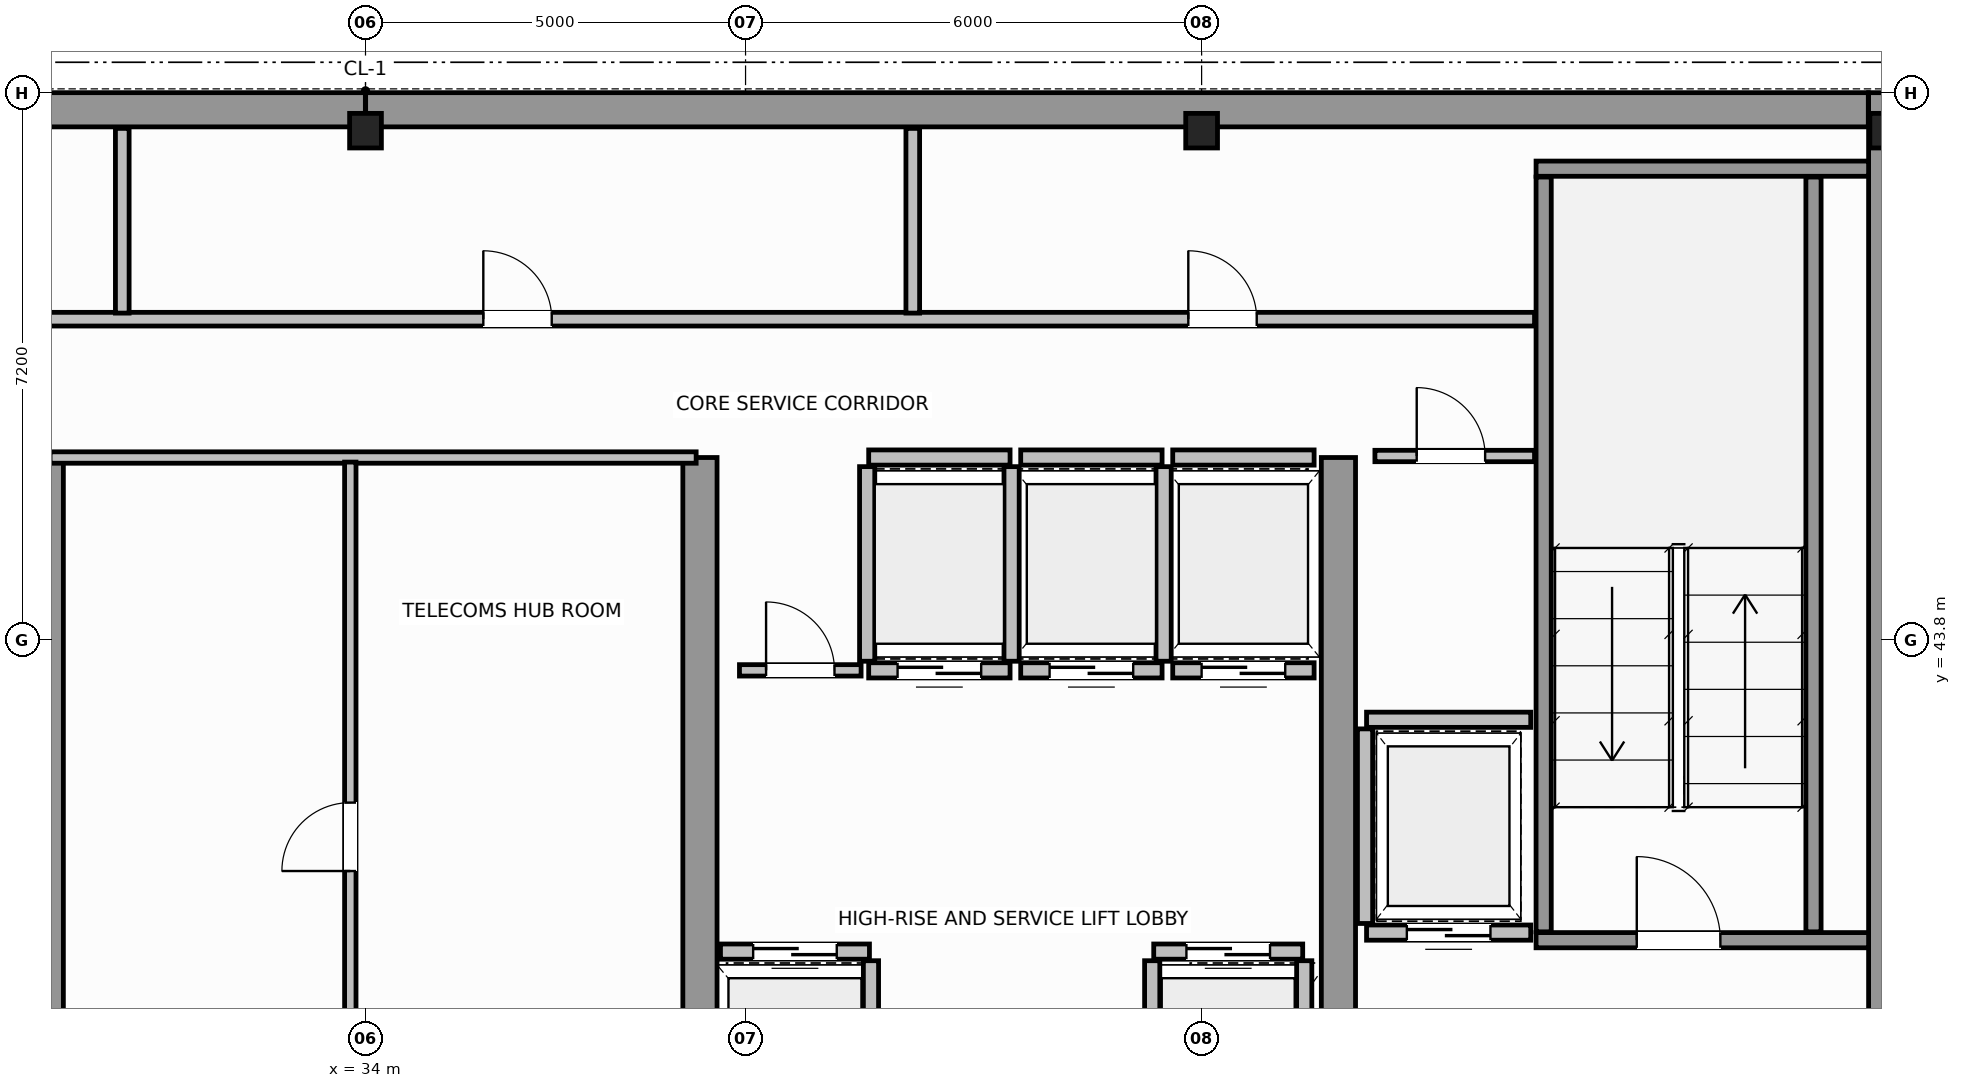
"""IFC4 building model, lengths in metres.
Left out: names, types, materials, properties, quantities, classifications, styles, units other than length and angle.
Written with IfcOpenShell. Run it as: python <this file> out.ifc"""

import sys

from ifc_helpers import new_model, si_unit, direction, frame, frame_2d, origin, origin_2d, place, context, subcontext, project, spatial, rectangle, i_section, extrude, source, transform, mapped, element, fill, save


model = new_model("IFC4")
c1 = context("Model", 3, precision=1e-05, world=origin(), true_north=direction((0.0, 1.0)))
c2 = subcontext(c1, "Body", "Model", "MODEL_VIEW")
j1 = project(units=[si_unit("LENGTHUNIT", "METRE"), si_unit("PLANEANGLEUNIT", "RADIAN")], contexts=[c1])
p1 = place(None, origin())
s1 = spatial("IfcSite", under=j1, at=p1, CompositionType="ELEMENT")
p2 = place(p1, origin())
s2 = spatial("IfcBuilding", under=s1, at=p2, CompositionType="ELEMENT")
p3 = place(p2, frame((0.0, 0.0, 268.8)))
s3 = spatial("IfcBuildingStorey", under=s2, at=p3, CompositionType="ELEMENT", Elevation=268.8)
m1 = source(origin(), c2, "Body", "SweptSolid", [
    extrude(i_section(OverallWidth=0.418, OverallDepth=0.455, WebThickness=0.042, FlangeThickness=0.058, FilletRadius=0.015, at=origin_2d()), origin(), (0.0, 0.0, 1.0), 3.8),
])
for number, where, z_axis, x_axis in (
    (1, (34.0, 50.5, 0.0), (0.0, 0.0, 1.0), (1.0, 0.0, 0.0)),
    (2, (45.0, 50.5, 0.0), (0.0, 0.0, 1.0), (1.0, 0.0, 0.0)),
    (3, (54.0, 50.5, 0.0), (0.0, 0.0, 1.0), (1.0, 0.0, 0.0)),
):
    element("IfcColumn", number, at=place(p3, frame(where, z_axis=z_axis, x_axis=x_axis)), inside=s3, PredefinedType="COLUMN", context=c2, shape_type="MappedRepresentation", body=[
        mapped(m1, transform((0.0, 0.0, 0.0), scale=1.0)),
    ])
for number, where, z_axis, x_axis in (
    (4, (14.229, 50.775, 0.0), (0.0, 0.0, 1.0), (1.0, 0.0, 0.0)),
    (5, (34.002, 50.775, 0.0), (0.0, 0.0, 1.0), (1.0, 0.0, 0.0)),
):
    element("IfcWall", number, at=place(p3, frame(where, z_axis=z_axis, x_axis=x_axis)), inside=s3, PredefinedType="SHEAR", context=c2, shape_type="SweptSolid", body=[
        extrude(rectangle(XDim=19.769, YDim=0.45, at=frame_2d((9.885, 0.0))), origin(), (0.0, 0.0, 1.0), 3.8),
    ])
p4 = place(p3, frame((54.0, 36.5, 0.0), z_axis=(0.0, 0.0, 1.0), x_axis=(0.0, 1.0, 0.0)))
e6 = element("IfcWall", 6, at=p4, inside=s3, PredefinedType="SHEAR", context=c2, shape_type="SweptSolid", body=[
    extrude(rectangle(XDim=14.5, YDim=0.45, at=frame_2d((7.25, 0.0))), origin(), (0.0, 0.0, 1.0), 3.8),
])
for number, where, z_axis, x_axis in (
    (7, (29.8, 36.745, 0.0), (0.0, 0.0, 1.0), (0.0, 1.0, 0.0)),
    (8, (38.4, 36.745, 0.0), (0.0, 0.0, 1.0), (0.0, 1.0, 0.0)),
    (9, (46.8, 36.745, 0.0), (0.0, 0.0, 1.0), (0.0, 1.0, 0.0)),
):
    element("IfcWall", number, at=place(p3, frame(where, z_axis=z_axis, x_axis=x_axis)), inside=s3, PredefinedType="SHEAR", context=c2, shape_type="SweptSolid", body=[
        extrude(rectangle(XDim=9.455, YDim=0.45, at=frame_2d((4.728, 0.0))), origin(), (0.0, 0.0, 1.0), 3.8),
    ])
p5 = place(p3, frame((49.4, 39.85, 0.0), z_axis=(0.0, 0.0, 1.0), x_axis=(1.0, 0.0, 0.0)))
e10 = element("IfcWall", 10, at=p5, inside=s3, PredefinedType="SOLIDWALL", context=c2, shape_type="SweptSolid", body=[
    extrude(rectangle(XDim=4.375, YDim=0.2, at=frame_2d((2.188, 0.0))), origin(), (0.0, 0.0, 1.0), 3.8),
])
p6 = place(p5, frame((1.325, 0.0, 0.0)))
e11 = element("IfcOpeningElement", 11, at=p6, cuts=e10, PredefinedType="OPENING", context=c2, shape_type="SweptSolid", body=[
    extrude(rectangle(XDim=1.1, YDim=2.15, at=frame_2d((0.55, 1.075))), frame((0.0, 0.11, 0.0), z_axis=(0.0, -1.0, 0.0), x_axis=(1.0, 0.0, 0.0)), (0.0, 0.0, 1.0), 0.22),
])
p7 = place(p3, frame((49.4, 50.0, 0.0), z_axis=(0.0, 0.0, 1.0), x_axis=(1.0, 0.0, 0.0)))
e12 = element("IfcWall", 12, at=p7, inside=s3, PredefinedType="SOLIDWALL", context=c2, shape_type="SweptSolid", body=[
    extrude(rectangle(XDim=4.375, YDim=0.2, at=frame_2d((2.188, 0.0))), origin(), (0.0, 0.0, 1.0), 3.8),
])
for number, where, z_axis, x_axis in (
    (13, (49.5, 39.96, 0.0), (0.0, 0.0, 1.0), (0.0, 1.0, 0.0)),
    (14, (53.05, 39.96, 0.0), (0.0, 0.0, 1.0), (0.0, 1.0, 0.0)),
):
    element("IfcWall", number, at=place(p3, frame(where, z_axis=z_axis, x_axis=x_axis)), inside=s3, PredefinedType="SOLIDWALL", context=c2, shape_type="SweptSolid", body=[
        extrude(rectangle(XDim=9.93, YDim=0.2, at=frame_2d((4.965, 0.0))), origin(), (0.0, 0.0, 1.0), 3.8),
    ])
p8 = place(p3, frame((38.67, 39.7, 0.0), z_axis=(0.0, 0.0, 1.0), x_axis=(1.0, 0.0, 0.0)))
e15 = element("IfcWall", 15, at=p8, inside=s3, PredefinedType="SOLIDWALL", context=c2, shape_type="SweptSolid", body=[
    extrude(rectangle(XDim=1.96, YDim=0.2, at=frame_2d((0.98, 0.0))), origin(), (0.0, 0.0, 1.0), 3.58),
])
p9 = place(p8, frame((0.43, 0.0, 0.0)))
e16 = element("IfcOpeningElement", 16, at=p9, cuts=e15, PredefinedType="OPENING", context=c2, shape_type="SweptSolid", body=[
    extrude(rectangle(XDim=1.1, YDim=2.15, at=frame_2d((0.55, 1.075))), frame((0.0, 0.11, 0.0), z_axis=(0.0, -1.0, 0.0), x_axis=(1.0, 0.0, 0.0)), (0.0, 0.0, 1.0), 0.22),
])
p10 = place(p3, frame((40.65, 37.02, 0.0), z_axis=(0.0, 0.0, 1.0), x_axis=(0.0, 1.0, 0.0)))
e17 = element("IfcWall", 17, at=p10, inside=s3, PredefinedType="SOLIDWALL", context=c2, shape_type="SweptSolid", body=[
    extrude(rectangle(XDim=2.56, YDim=0.2, at=frame_2d((1.28, 0.0))), origin(), (0.0, 0.0, 1.0), 3.58),
])
p11 = place(p3, frame((44.37, 39.7, 0.0), z_axis=(0.0, 0.0, 1.0), x_axis=(1.0, 0.0, 0.0)))
e18 = element("IfcWall", 18, at=p11, inside=s3, PredefinedType="SOLIDWALL", context=c2, shape_type="SweptSolid", body=[
    extrude(rectangle(XDim=1.96, YDim=0.2, at=frame_2d((0.98, 0.0))), origin(), (0.0, 0.0, 1.0), 3.58),
])
p12 = place(p11, frame((0.43, 0.0, 0.0)))
e19 = element("IfcOpeningElement", 19, at=p12, cuts=e18, PredefinedType="OPENING", context=c2, shape_type="SweptSolid", body=[
    extrude(rectangle(XDim=1.1, YDim=2.15, at=frame_2d((0.55, 1.075))), frame((0.0, 0.11, 0.0), z_axis=(0.0, -1.0, 0.0), x_axis=(1.0, 0.0, 0.0)), (0.0, 0.0, 1.0), 0.22),
])
for number, where, z_axis, x_axis in (
    (20, (44.35, 37.02, 0.0), (0.0, 0.0, 1.0), (0.0, 1.0, 0.0)),
    (21, (46.35, 37.02, 0.0), (0.0, 0.0, 1.0), (0.0, 1.0, 0.0)),
):
    element("IfcWall", number, at=place(p3, frame(where, z_axis=z_axis, x_axis=x_axis)), inside=s3, PredefinedType="SOLIDWALL", context=c2, shape_type="SweptSolid", body=[
        extrude(rectangle(XDim=2.56, YDim=0.2, at=frame_2d((1.28, 0.0))), origin(), (0.0, 0.0, 1.0), 3.58),
    ])
p13 = place(p3, frame((40.62, 43.4, 0.0), z_axis=(0.0, 0.0, 1.0), x_axis=(1.0, 0.0, 0.0)))
e22 = element("IfcWall", 22, at=p13, inside=s3, PredefinedType="SOLIDWALL", context=c2, shape_type="SweptSolid", body=[
    extrude(rectangle(XDim=1.86, YDim=0.2, at=frame_2d((0.93, 0.0))), origin(), (0.0, 0.0, 1.0), 3.58),
])
p14 = place(p13, frame((0.38, 0.0, 0.0)))
e23 = element("IfcOpeningElement", 23, at=p14, cuts=e22, PredefinedType="OPENING", context=c2, shape_type="SweptSolid", body=[
    extrude(rectangle(XDim=1.1, YDim=2.15, at=frame_2d((0.55, 1.075))), frame((0.0, 0.11, 0.0), z_axis=(0.0, -1.0, 0.0), x_axis=(1.0, 0.0, 0.0)), (0.0, 0.0, 1.0), 0.22),
])
p15 = place(p3, frame((40.62, 46.2, 0.0), z_axis=(0.0, 0.0, 1.0), x_axis=(1.0, 0.0, 0.0)))
e24 = element("IfcWall", 24, at=p15, inside=s3, PredefinedType="SOLIDWALL", context=c2, shape_type="SweptSolid", body=[
    extrude(rectangle(XDim=1.86, YDim=0.2, at=frame_2d((0.93, 0.0))), origin(), (0.0, 0.0, 1.0), 3.58),
])
for number, where, z_axis, x_axis in (
    (25, (40.6, 43.52, 0.0), (0.0, 0.0, 1.0), (0.0, 1.0, 0.0)),
    (26, (42.5, 43.52, 0.0), (0.0, 0.0, 1.0), (0.0, 1.0, 0.0)),
):
    element("IfcWall", number, at=place(p3, frame(where, z_axis=z_axis, x_axis=x_axis)), inside=s3, PredefinedType="SOLIDWALL", context=c2, shape_type="SweptSolid", body=[
        extrude(rectangle(XDim=2.56, YDim=0.2, at=frame_2d((1.28, 0.0))), origin(), (0.0, 0.0, 1.0), 3.58),
    ])
p16 = place(p3, frame((42.62, 43.4, 0.0), z_axis=(0.0, 0.0, 1.0), x_axis=(1.0, 0.0, 0.0)))
e27 = element("IfcWall", 27, at=p16, inside=s3, PredefinedType="SOLIDWALL", context=c2, shape_type="SweptSolid", body=[
    extrude(rectangle(XDim=1.86, YDim=0.2, at=frame_2d((0.93, 0.0))), origin(), (0.0, 0.0, 1.0), 3.58),
])
p17 = place(p16, frame((0.38, 0.0, 0.0)))
e28 = element("IfcOpeningElement", 28, at=p17, cuts=e27, PredefinedType="OPENING", context=c2, shape_type="SweptSolid", body=[
    extrude(rectangle(XDim=1.1, YDim=2.15, at=frame_2d((0.55, 1.075))), frame((0.0, 0.11, 0.0), z_axis=(0.0, -1.0, 0.0), x_axis=(1.0, 0.0, 0.0)), (0.0, 0.0, 1.0), 0.22),
])
p18 = place(p3, frame((42.62, 46.2, 0.0), z_axis=(0.0, 0.0, 1.0), x_axis=(1.0, 0.0, 0.0)))
e29 = element("IfcWall", 29, at=p18, inside=s3, PredefinedType="SOLIDWALL", context=c2, shape_type="SweptSolid", body=[
    extrude(rectangle(XDim=1.86, YDim=0.2, at=frame_2d((0.93, 0.0))), origin(), (0.0, 0.0, 1.0), 3.58),
])
p19 = place(p3, frame((44.5, 43.52, 0.0), z_axis=(0.0, 0.0, 1.0), x_axis=(0.0, 1.0, 0.0)))
e30 = element("IfcWall", 30, at=p19, inside=s3, PredefinedType="SOLIDWALL", context=c2, shape_type="SweptSolid", body=[
    extrude(rectangle(XDim=2.56, YDim=0.2, at=frame_2d((1.28, 0.0))), origin(), (0.0, 0.0, 1.0), 3.58),
])
p20 = place(p3, frame((44.62, 43.4, 0.0), z_axis=(0.0, 0.0, 1.0), x_axis=(1.0, 0.0, 0.0)))
e31 = element("IfcWall", 31, at=p20, inside=s3, PredefinedType="SOLIDWALL", context=c2, shape_type="SweptSolid", body=[
    extrude(rectangle(XDim=1.86, YDim=0.2, at=frame_2d((0.93, 0.0))), origin(), (0.0, 0.0, 1.0), 3.58),
])
p21 = place(p20, frame((0.38, 0.0, 0.0)))
e32 = element("IfcOpeningElement", 32, at=p21, cuts=e31, PredefinedType="OPENING", context=c2, shape_type="SweptSolid", body=[
    extrude(rectangle(XDim=1.1, YDim=2.15, at=frame_2d((0.55, 1.075))), frame((0.0, 0.11, 0.0), z_axis=(0.0, -1.0, 0.0), x_axis=(1.0, 0.0, 0.0)), (0.0, 0.0, 1.0), 0.22),
])
p22 = place(p3, frame((44.62, 46.2, 0.0), z_axis=(0.0, 0.0, 1.0), x_axis=(1.0, 0.0, 0.0)))
e33 = element("IfcWall", 33, at=p22, inside=s3, PredefinedType="SOLIDWALL", context=c2, shape_type="SweptSolid", body=[
    extrude(rectangle(XDim=1.86, YDim=0.2, at=frame_2d((0.93, 0.0))), origin(), (0.0, 0.0, 1.0), 3.58),
])
p23 = place(p3, frame((47.17, 39.95, 0.0), z_axis=(0.0, 0.0, 1.0), x_axis=(1.0, 0.0, 0.0)))
e34 = element("IfcWall", 34, at=p23, inside=s3, PredefinedType="SOLIDWALL", context=c2, shape_type="SweptSolid", body=[
    extrude(rectangle(XDim=2.16, YDim=0.2, at=frame_2d((1.08, 0.0))), origin(), (0.0, 0.0, 1.0), 3.58),
])
p24 = place(p23, frame((0.53, 0.0, 0.0)))
e35 = element("IfcOpeningElement", 35, at=p24, cuts=e34, PredefinedType="OPENING", context=c2, shape_type="SweptSolid", body=[
    extrude(rectangle(XDim=1.1, YDim=2.15, at=frame_2d((0.55, 1.075))), frame((0.0, 0.11, 0.0), z_axis=(0.0, -1.0, 0.0), x_axis=(1.0, 0.0, 0.0)), (0.0, 0.0, 1.0), 0.22),
])
p25 = place(p3, frame((47.17, 42.75, 0.0), z_axis=(0.0, 0.0, 1.0), x_axis=(1.0, 0.0, 0.0)))
e36 = element("IfcWall", 36, at=p25, inside=s3, PredefinedType="SOLIDWALL", context=c2, shape_type="SweptSolid", body=[
    extrude(rectangle(XDim=2.16, YDim=0.2, at=frame_2d((1.08, 0.0))), origin(), (0.0, 0.0, 1.0), 3.58),
])
p26 = place(p3, frame((47.15, 40.07, 0.0), z_axis=(0.0, 0.0, 1.0), x_axis=(0.0, 1.0, 0.0)))
e37 = element("IfcWall", 37, at=p26, inside=s3, PredefinedType="SOLIDWALL", context=c2, shape_type="SweptSolid", body=[
    extrude(rectangle(XDim=2.56, YDim=0.2, at=frame_2d((1.28, 0.0))), origin(), (0.0, 0.0, 1.0), 3.58),
])
p27 = place(p3, frame((29.85, 46.2, 0.0), z_axis=(0.0, 0.0, 1.0), x_axis=(1.0, 0.0, 0.0)))
e38 = element("IfcWall", 38, at=p27, inside=s3, PredefinedType="PARTITIONING", context=c2, shape_type="SweptSolid", body=[
    extrude(rectangle(XDim=8.5, YDim=0.15, at=frame_2d((4.25, 0.0))), origin(), (0.0, 0.0, 1.0), 3.58),
])
p28 = place(p3, frame((33.8, 36.56, 0.0), z_axis=(0.0, 0.0, 1.0), x_axis=(0.0, 1.0, 0.0)))
e39 = element("IfcWall", 39, at=p28, inside=s3, PredefinedType="PARTITIONING", context=c2, shape_type="SweptSolid", body=[
    extrude(rectangle(XDim=9.58, YDim=0.15, at=frame_2d((4.79, 0.0))), origin(), (0.0, 0.0, 1.0), 3.58),
])
p29 = place(p28, frame((4.2, 0.0, 0.0)))
e40 = element("IfcOpeningElement", 40, at=p29, cuts=e39, PredefinedType="OPENING", context=c2, shape_type="SweptSolid", body=[
    extrude(rectangle(XDim=0.9, YDim=2.1, at=frame_2d((0.45, 1.05))), frame((0.0, 0.085, 0.0), z_axis=(0.0, -1.0, 0.0), x_axis=(1.0, 0.0, 0.0)), (0.0, 0.0, 1.0), 0.17),
])
p30 = place(p3, frame((47.28, 46.22, 0.0), z_axis=(0.0, 0.0, 1.0), x_axis=(1.0, 0.0, 0.0)))
e41 = element("IfcWall", 41, at=p30, inside=s3, PredefinedType="PARTITIONING", context=c2, shape_type="SweptSolid", body=[
    extrude(rectangle(XDim=2.1, YDim=0.15, at=frame_2d((1.05, 0.0))), origin(), (0.0, 0.0, 1.0), 3.58),
])
p31 = place(p30, frame((0.55, 0.0, 0.0)))
e42 = element("IfcOpeningElement", 42, at=p31, cuts=e41, PredefinedType="OPENING", context=c2, shape_type="SweptSolid", body=[
    extrude(rectangle(XDim=0.9, YDim=2.1, at=frame_2d((0.45, 1.05))), frame((0.0, 0.085, 0.0), z_axis=(0.0, -1.0, 0.0), x_axis=(1.0, 0.0, 0.0)), (0.0, 0.0, 1.0), 0.17),
])
p32 = place(p3, frame((38.92, 43.4, 0.0), z_axis=(0.0, 0.0, 1.0), x_axis=(1.0, 0.0, 0.0)))
e43 = element("IfcWall", 43, at=p32, inside=s3, PredefinedType="PARTITIONING", context=c2, shape_type="SweptSolid", body=[
    extrude(rectangle(XDim=1.6, YDim=0.15, at=frame_2d((0.8, 0.0))), origin(), (0.0, 0.0, 1.0), 3.58),
])
p33 = place(p32, frame((0.35, 0.0, 0.0)))
e44 = element("IfcOpeningElement", 44, at=p33, cuts=e43, PredefinedType="OPENING", context=c2, shape_type="SweptSolid", body=[
    extrude(rectangle(XDim=0.9, YDim=2.1, at=frame_2d((0.45, 1.05))), frame((0.0, 0.085, 0.0), z_axis=(0.0, -1.0, 0.0), x_axis=(1.0, 0.0, 0.0)), (0.0, 0.0, 1.0), 0.17),
])
p34 = place(p3, frame((18.62, 48.02, 0.0), z_axis=(0.0, 0.0, 1.0), x_axis=(1.0, 0.0, 0.0)))
e45 = element("IfcWall", 45, at=p34, inside=s3, PredefinedType="PLUMBINGWALL", context=c2, shape_type="SweptSolid", body=[
    extrude(rectangle(XDim=30.76, YDim=0.18, at=frame_2d((15.38, 0.0))), origin(), (0.0, 0.0, 1.0), 3.58),
])
p35 = place(p34, frame((1.955, 0.0, 0.0)))
e46 = element("IfcOpeningElement", 46, at=p35, cuts=e45, PredefinedType="OPENING", context=c2, shape_type="SweptSolid", body=[
    extrude(rectangle(XDim=0.9, YDim=2.15, at=frame_2d((0.45, 1.075))), frame((0.0, 0.1, 0.0), z_axis=(0.0, -1.0, 0.0), x_axis=(1.0, 0.0, 0.0)), (0.0, 0.0, 1.0), 0.2),
])
p36 = place(p34, frame((8.03, 0.0, 0.0)))
e47 = element("IfcOpeningElement", 47, at=p36, cuts=e45, PredefinedType="OPENING", context=c2, shape_type="SweptSolid", body=[
    extrude(rectangle(XDim=0.9, YDim=2.15, at=frame_2d((0.45, 1.075))), frame((0.0, 0.1, 0.0), z_axis=(0.0, -1.0, 0.0), x_axis=(1.0, 0.0, 0.0)), (0.0, 0.0, 1.0), 0.2),
])
p37 = place(p34, frame((16.93, 0.0, 0.0)))
e48 = element("IfcOpeningElement", 48, at=p37, cuts=e45, PredefinedType="OPENING", context=c2, shape_type="SweptSolid", body=[
    extrude(rectangle(XDim=0.9, YDim=2.15, at=frame_2d((0.45, 1.075))), frame((0.0, 0.1, 0.0), z_axis=(0.0, -1.0, 0.0), x_axis=(1.0, 0.0, 0.0)), (0.0, 0.0, 1.0), 0.2),
])
p38 = place(p34, frame((26.205, 0.0, 0.0)))
e49 = element("IfcOpeningElement", 49, at=p38, cuts=e45, PredefinedType="OPENING", context=c2, shape_type="SweptSolid", body=[
    extrude(rectangle(XDim=0.9, YDim=2.15, at=frame_2d((0.45, 1.075))), frame((0.0, 0.1, 0.0), z_axis=(0.0, -1.0, 0.0), x_axis=(1.0, 0.0, 0.0)), (0.0, 0.0, 1.0), 0.2),
])
for number, where, z_axis, x_axis in (
    (50, (30.8, 48.1, 0.0), (0.0, 0.0, 1.0), (0.0, 1.0, 0.0)),
    (51, (41.2, 48.1, 0.0), (0.0, 0.0, 1.0), (0.0, 1.0, 0.0)),
):
    element("IfcWall", number, at=place(p3, frame(where, z_axis=z_axis, x_axis=x_axis)), inside=s3, PredefinedType="PLUMBINGWALL", context=c2, shape_type="SweptSolid", body=[
        extrude(rectangle(XDim=2.43, YDim=0.18, at=frame_2d((1.215, 0.0))), origin(), (0.0, 0.0, 1.0), 3.58),
    ])
m2 = source(origin(), c2, "Body", "SweptSolid", [
    extrude(rectangle(XDim=1.1, YDim=2.15, at=frame_2d((0.55, 1.075))), frame((0.0, 0.025, 0.0), z_axis=(0.0, -1.0, 0.0), x_axis=(1.0, 0.0, 0.0)), (0.0, 0.0, 1.0), 0.05),
])
p39 = place(p6, origin())
e52 = element("IfcDoor", 52, at=p39, inside=s3, OperationType="SINGLE_SWING_RIGHT", PredefinedType="DOOR", context=c2, shape_type="MappedRepresentation", body=[
    mapped(m2, transform((0.0, 0.0, 0.0), scale=1.0)),
])
fill(e11, e52)
p40 = place(p9, origin())
e53 = element("IfcDoor", 53, at=p40, inside=s3, OperationType="DOUBLE_DOOR_SLIDING", PredefinedType="DOOR", context=c2, shape_type="MappedRepresentation", body=[
    mapped(m2, transform((0.0, 0.0, 0.0), scale=1.0)),
])
fill(e16, e53)
p41 = place(p12, origin())
e54 = element("IfcDoor", 54, at=p41, inside=s3, OperationType="DOUBLE_DOOR_SLIDING", PredefinedType="DOOR", context=c2, shape_type="MappedRepresentation", body=[
    mapped(m2, transform((0.0, 0.0, 0.0), scale=1.0)),
])
fill(e19, e54)
p42 = place(p14, origin())
e55 = element("IfcDoor", 55, at=p42, inside=s3, OperationType="DOUBLE_DOOR_SLIDING", PredefinedType="DOOR", context=c2, shape_type="MappedRepresentation", body=[
    mapped(m2, transform((0.0, 0.0, 0.0), scale=1.0)),
])
fill(e23, e55)
p43 = place(p17, origin())
e56 = element("IfcDoor", 56, at=p43, inside=s3, OperationType="DOUBLE_DOOR_SLIDING", PredefinedType="DOOR", context=c2, shape_type="MappedRepresentation", body=[
    mapped(m2, transform((0.0, 0.0, 0.0), scale=1.0)),
])
fill(e28, e56)
p44 = place(p21, origin())
e57 = element("IfcDoor", 57, at=p44, inside=s3, OperationType="DOUBLE_DOOR_SLIDING", PredefinedType="DOOR", context=c2, shape_type="MappedRepresentation", body=[
    mapped(m2, transform((0.0, 0.0, 0.0), scale=1.0)),
])
fill(e32, e57)
p45 = place(p24, origin())
e58 = element("IfcDoor", 58, at=p45, inside=s3, OperationType="DOUBLE_DOOR_SLIDING", PredefinedType="DOOR", context=c2, shape_type="MappedRepresentation", body=[
    mapped(m2, transform((0.0, 0.0, 0.0), scale=1.0)),
])
fill(e35, e58)
m3 = source(origin(), c2, "Body", "SweptSolid", [
    extrude(rectangle(XDim=0.9, YDim=2.1, at=frame_2d((0.45, 1.05))), frame((0.0, 0.025, 0.0), z_axis=(0.0, -1.0, 0.0), x_axis=(1.0, 0.0, 0.0)), (0.0, 0.0, 1.0), 0.05),
])
p46 = place(p29, origin())
e59 = element("IfcDoor", 59, at=p46, inside=s3, OperationType="SINGLE_SWING_RIGHT", PredefinedType="DOOR", context=c2, shape_type="MappedRepresentation", body=[
    mapped(m3, transform((0.0, 0.0, 0.0), scale=1.0)),
])
fill(e40, e59)
p47 = place(p31, origin())
e60 = element("IfcDoor", 60, at=p47, inside=s3, OperationType="SINGLE_SWING_RIGHT", PredefinedType="DOOR", context=c2, shape_type="MappedRepresentation", body=[
    mapped(m3, transform((0.0, 0.0, 0.0), scale=1.0)),
])
fill(e42, e60)
p48 = place(p33, origin())
e61 = element("IfcDoor", 61, at=p48, inside=s3, OperationType="SINGLE_SWING_LEFT", PredefinedType="DOOR", context=c2, shape_type="MappedRepresentation", body=[
    mapped(m3, transform((0.0, 0.0, 0.0), scale=1.0)),
])
fill(e44, e61)
m4 = source(origin(), c2, "Body", "SweptSolid", [
    extrude(rectangle(XDim=0.9, YDim=2.15, at=frame_2d((0.45, 1.075))), frame((0.0, 0.025, 0.0), z_axis=(0.0, -1.0, 0.0), x_axis=(1.0, 0.0, 0.0)), (0.0, 0.0, 1.0), 0.05),
])
p49 = place(p37, origin())
e62 = element("IfcDoor", 62, at=p49, inside=s3, OperationType="SINGLE_SWING_LEFT", PredefinedType="DOOR", context=c2, shape_type="MappedRepresentation", body=[
    mapped(m4, transform((0.0, 0.0, 0.0), scale=1.0)),
])
fill(e48, e62)
p50 = place(p38, origin())
e63 = element("IfcDoor", 63, at=p50, inside=s3, OperationType="SINGLE_SWING_RIGHT", PredefinedType="DOOR", context=c2, shape_type="MappedRepresentation", body=[
    mapped(m4, transform((0.0, 0.0, 0.0), scale=1.0)),
])
fill(e49, e63)
save(model, sys.argv[1])
